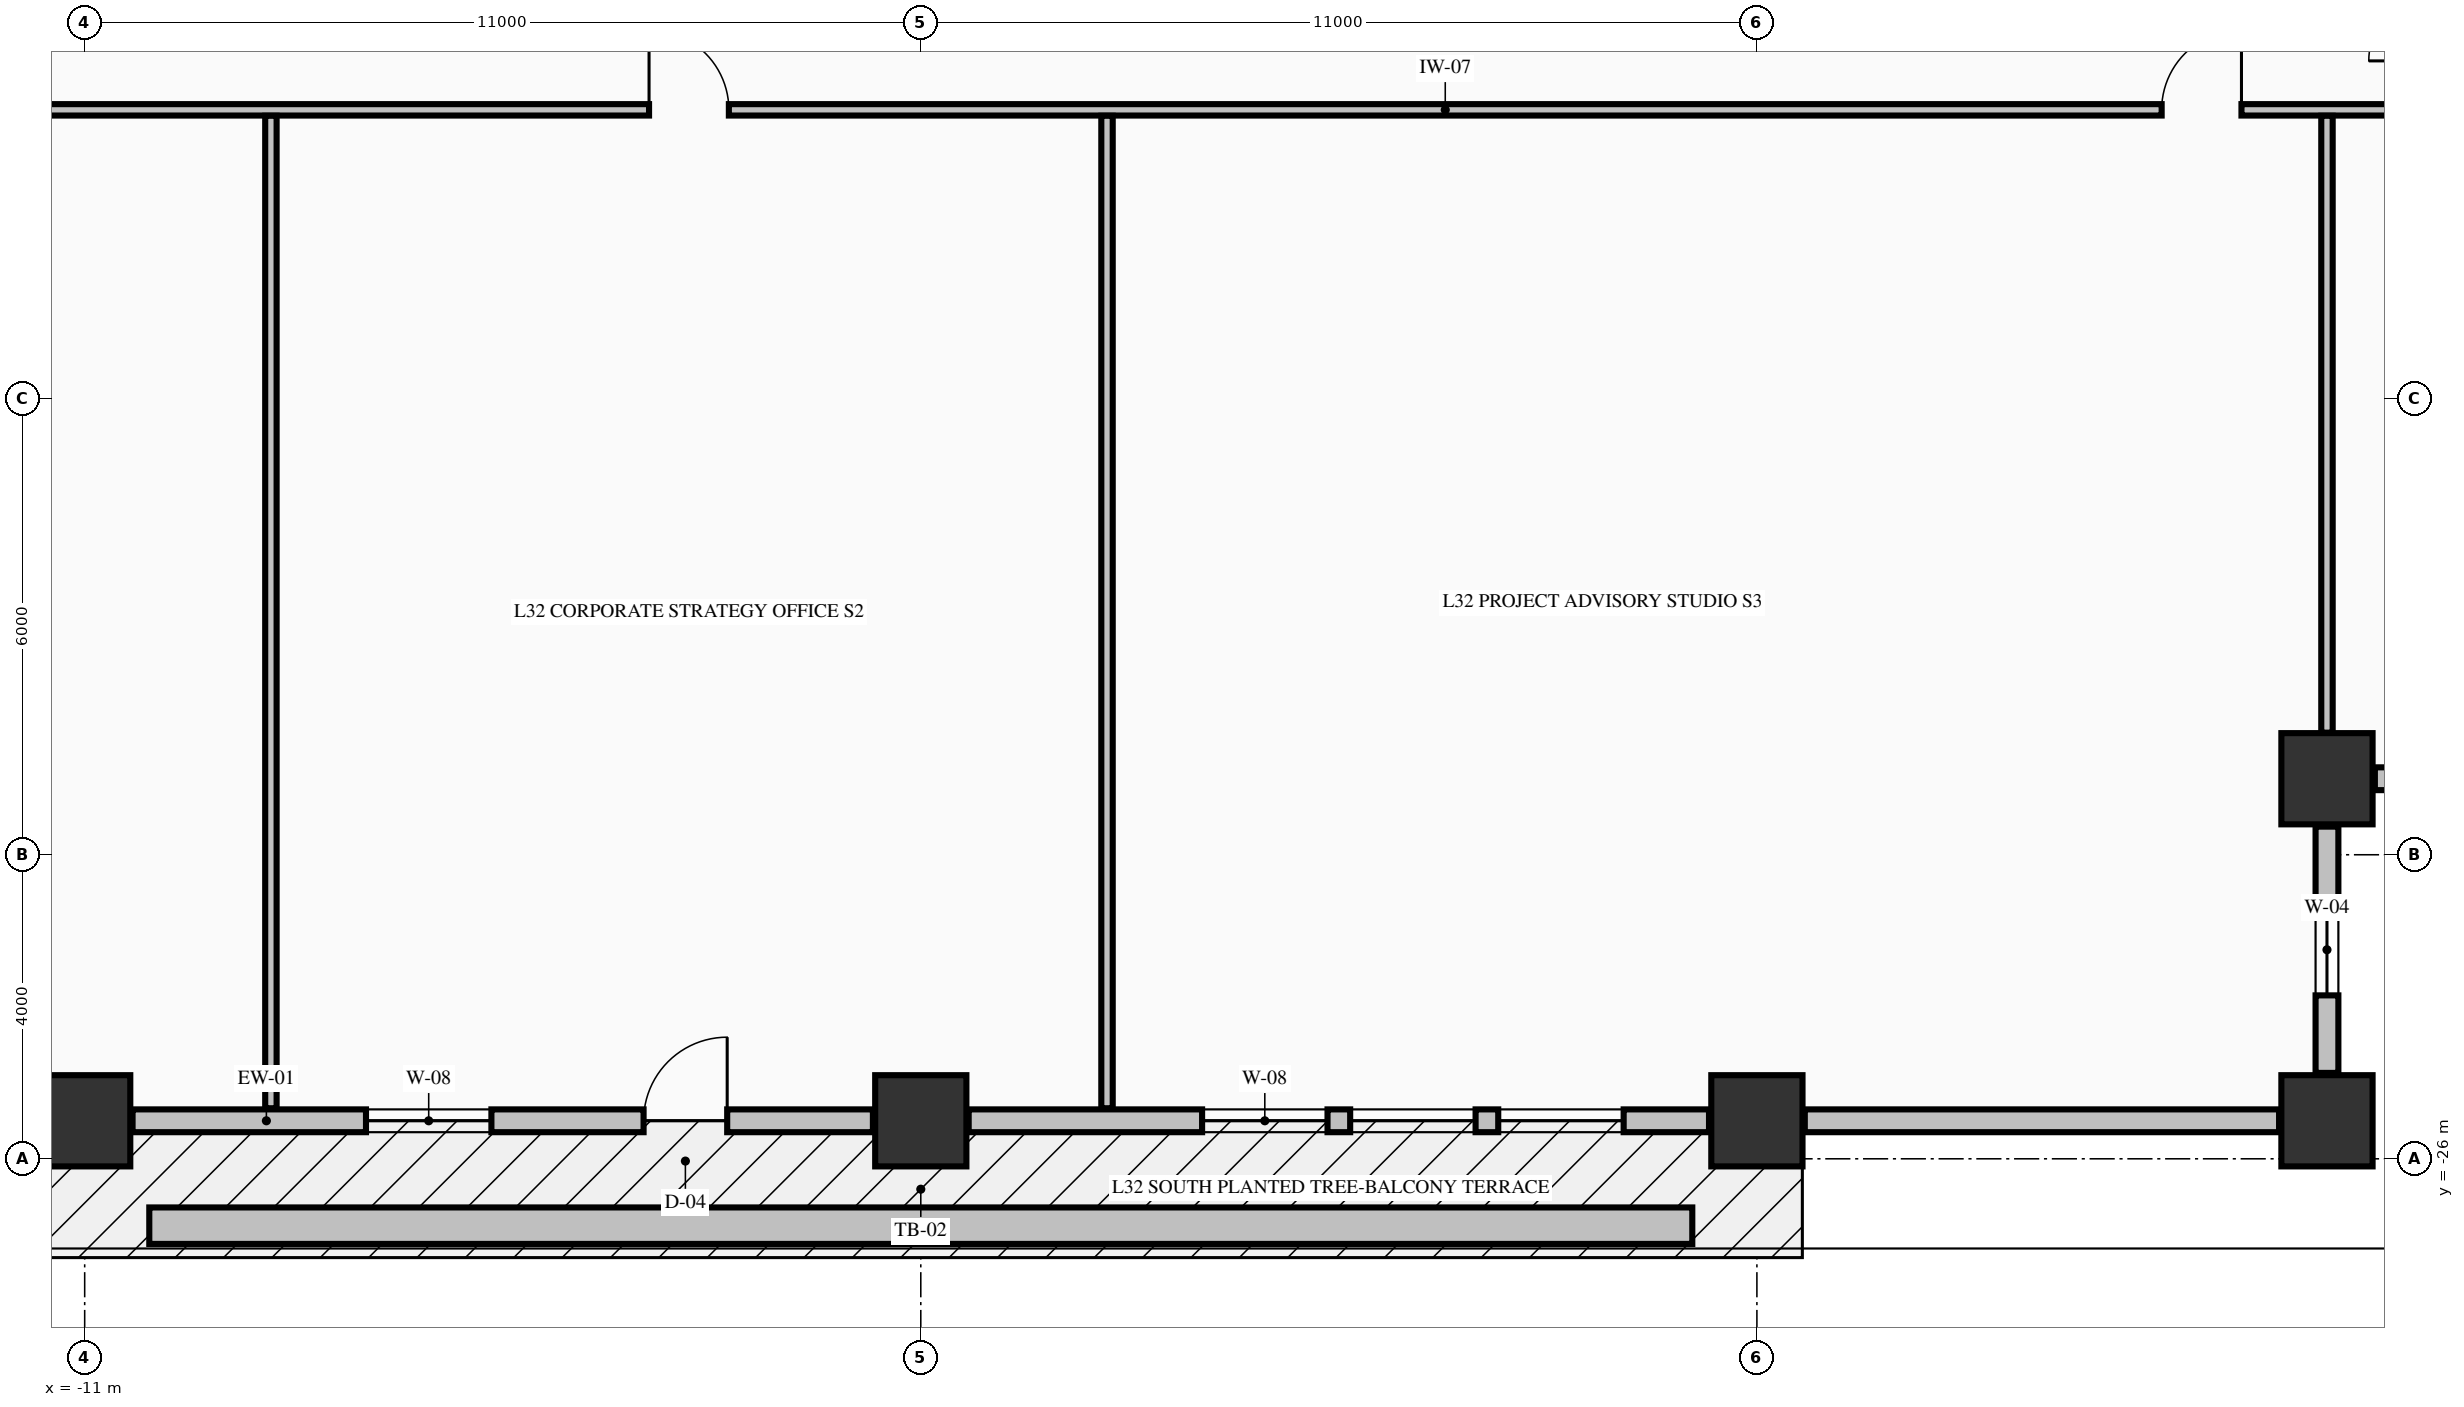
"""IFC4 building model, lengths in metres.
Left out: names, types, materials, properties, quantities, classifications, styles, units other than length and angle.
Written with IfcOpenShell. Run it as: python <this file> out.ifc"""

import sys

from ifc_helpers import new_model, si_unit, direction, frame, frame_2d, origin, origin_2d, place, context, subcontext, project, spatial, rectangle, extrude, element, fill, save


model = new_model("IFC4")
c1 = context("Model", 3, precision=1e-05, world=origin(), true_north=direction((0.0, 1.0)))
c2 = subcontext(c1, "Body", "Model", "MODEL_VIEW")
j1 = project(units=[si_unit("LENGTHUNIT", "METRE"), si_unit("PLANEANGLEUNIT", "RADIAN")], contexts=[c1])
p1 = place(None, origin())
s1 = spatial("IfcSite", under=j1, at=p1, CompositionType="ELEMENT")
p2 = place(p1, origin())
s2 = spatial("IfcBuilding", under=s1, at=p2, CompositionType="ELEMENT")
p3 = place(p2, frame((0.0, 0.0, 128.49)))
s3 = spatial("IfcBuildingStorey", under=s2, at=p3, CompositionType="ELEMENT", Elevation=128.49)
for number, where, z_axis, x_axis in (
    (1, (-11.0, -25.5, -0.25), (0.0, 0.0, 1.0), (1.0, 0.0, 0.0)),
    (2, (0.0, -25.5, -0.25), (0.0, 0.0, 1.0), (1.0, 0.0, 0.0)),
    (3, (11.0, -25.5, -0.25), (0.0, 0.0, 1.0), (1.0, 0.0, 0.0)),
    (4, (18.5, -25.5, -0.25), (0.0, 0.0, 1.0), (1.0, 0.0, 0.0)),
    (5, (18.5, -21.0, -0.25), (0.0, 0.0, 1.0), (1.0, 0.0, 0.0)),
):
    element("IfcColumn", number, at=place(p3, frame(where, z_axis=z_axis, x_axis=x_axis)), inside=s3, PredefinedType="COLUMN", context=c2, shape_type="SweptSolid", body=[
        extrude(rectangle(XDim=1.2, YDim=1.2, at=origin_2d()), origin(), (0.0, 0.0, 1.0), 3.57),
    ])
p4 = place(p3, frame((18.5, -24.87, 0.0), z_axis=(0.0, 0.0, 1.0), x_axis=(0.0, 1.0, 0.0)))
e6 = element("IfcWall", 6, at=p4, inside=s3, PredefinedType="STANDARD", context=c2, shape_type="SweptSolid", body=[
    extrude(rectangle(XDim=3.24, YDim=0.3, at=frame_2d((1.62, 0.0))), origin(), (0.0, 0.0, 1.0), 2.712),
])
p5 = place(p4, frame((1.02, 0.0, 0.82)))
e7 = element("IfcOpeningElement", 7, at=p5, cuts=e6, PredefinedType="OPENING", context=c2, shape_type="SweptSolid", body=[
    extrude(rectangle(XDim=1.2, YDim=1.65, at=frame_2d((0.6, 0.825))), frame((0.0, 0.16, 0.0), z_axis=(0.0, -1.0, 0.0), x_axis=(1.0, 0.0, 0.0)), (0.0, 0.0, 1.0), 0.32),
])
p6 = place(p3, frame((19.13, -21.0, 0.0), z_axis=(0.0, 0.0, 1.0), x_axis=(1.0, 0.0, 0.0)))
e8 = element("IfcWall", 8, at=p6, inside=s3, PredefinedType="STANDARD", context=c2, shape_type="SweptSolid", body=[
    extrude(rectangle(XDim=3.24, YDim=0.3, at=frame_2d((1.62, 0.0))), origin(), (0.0, 0.0, 1.0), 2.712),
])
p7 = place(p6, frame((1.02, 0.0, 0.82)))
e9 = element("IfcOpeningElement", 9, at=p7, cuts=e8, PredefinedType="OPENING", context=c2, shape_type="SweptSolid", body=[
    extrude(rectangle(XDim=1.2, YDim=1.65, at=frame_2d((0.6, 0.825))), frame((0.0, 0.16, 0.0), z_axis=(0.0, -1.0, 0.0), x_axis=(1.0, 0.0, 0.0)), (0.0, 0.0, 1.0), 0.32),
])
p8 = place(p3, frame((-10.37, -25.5, 0.0), z_axis=(0.0, 0.0, 1.0), x_axis=(1.0, 0.0, 0.0)))
e10 = element("IfcWall", 10, at=p8, inside=s3, PredefinedType="STANDARD", context=c2, shape_type="SweptSolid", body=[
    extrude(rectangle(XDim=9.74, YDim=0.3, at=frame_2d((4.87, 0.0))), origin(), (0.0, 0.0, 1.0), 2.712),
])
p9 = place(p8, frame((6.723, 0.0, 0.0)))
e11 = element("IfcOpeningElement", 11, at=p9, cuts=e10, PredefinedType="OPENING", context=c2, shape_type="SweptSolid", body=[
    extrude(rectangle(XDim=1.1, YDim=2.15, at=frame_2d((0.55, 1.075))), frame((0.0, 0.16, 0.0), z_axis=(0.0, -1.0, 0.0), x_axis=(1.0, 0.0, 0.0)), (0.0, 0.0, 1.0), 0.32),
])
p10 = place(p8, frame((3.071, 0.0, 0.8)))
e12 = element("IfcOpeningElement", 12, at=p10, cuts=e10, PredefinedType="OPENING", context=c2, shape_type="SweptSolid", body=[
    extrude(rectangle(XDim=1.65, YDim=1.7, at=frame_2d((0.825, 0.85))), frame((0.0, 0.16, 0.0), z_axis=(0.0, -1.0, 0.0), x_axis=(1.0, 0.0, 0.0)), (0.0, 0.0, 1.0), 0.32),
])
p11 = place(p3, frame((0.63, -25.5, 0.0), z_axis=(0.0, 0.0, 1.0), x_axis=(1.0, 0.0, 0.0)))
e13 = element("IfcWall", 13, at=p11, inside=s3, PredefinedType="STANDARD", context=c2, shape_type="SweptSolid", body=[
    extrude(rectangle(XDim=9.74, YDim=0.3, at=frame_2d((4.87, 0.0))), origin(), (0.0, 0.0, 1.0), 2.712),
])
p12 = place(p11, frame((3.071, 0.0, 0.8)))
e14 = element("IfcOpeningElement", 14, at=p12, cuts=e13, PredefinedType="OPENING", context=c2, shape_type="SweptSolid", body=[
    extrude(rectangle(XDim=1.65, YDim=1.7, at=frame_2d((0.825, 0.85))), frame((0.0, 0.16, 0.0), z_axis=(0.0, -1.0, 0.0), x_axis=(1.0, 0.0, 0.0)), (0.0, 0.0, 1.0), 0.32),
])
p13 = place(p11, frame((5.019, 0.0, 0.8)))
e15 = element("IfcOpeningElement", 15, at=p13, cuts=e13, PredefinedType="OPENING", context=c2, shape_type="SweptSolid", body=[
    extrude(rectangle(XDim=1.65, YDim=1.7, at=frame_2d((0.825, 0.85))), frame((0.0, 0.16, 0.0), z_axis=(0.0, -1.0, 0.0), x_axis=(1.0, 0.0, 0.0)), (0.0, 0.0, 1.0), 0.32),
])
p14 = place(p11, frame((6.967, 0.0, 0.8)))
e16 = element("IfcOpeningElement", 16, at=p14, cuts=e13, PredefinedType="OPENING", context=c2, shape_type="SweptSolid", body=[
    extrude(rectangle(XDim=1.65, YDim=1.7, at=frame_2d((0.825, 0.85))), frame((0.0, 0.16, 0.0), z_axis=(0.0, -1.0, 0.0), x_axis=(1.0, 0.0, 0.0)), (0.0, 0.0, 1.0), 0.32),
])
p15 = place(p3, frame((11.63, -25.5, 0.0), z_axis=(0.0, 0.0, 1.0), x_axis=(1.0, 0.0, 0.0)))
e17 = element("IfcWall", 17, at=p15, inside=s3, PredefinedType="STANDARD", context=c2, shape_type="SweptSolid", body=[
    extrude(rectangle(XDim=6.24, YDim=0.3, at=frame_2d((3.12, 0.0))), origin(), (0.0, 0.0, 1.0), 2.712),
])
p16 = place(p3, frame((-27.835, -12.2, 0.0), z_axis=(0.0, 0.0, 1.0), x_axis=(1.0, 0.0, 0.0)))
e18 = element("IfcWall", 18, at=p16, inside=s3, PredefinedType="PARTITIONING", context=c2, shape_type="SweptSolid", body=[
    extrude(rectangle(XDim=50.67, YDim=0.15, at=frame_2d((25.335, 0.0))), origin(), (0.0, 0.0, 1.0), 3.32),
])
p17 = place(p16, frame((13.13, 0.0, 0.0)))
e19 = element("IfcOpeningElement", 19, at=p17, cuts=e18, PredefinedType="OPENING", context=c2, shape_type="SweptSolid", body=[
    extrude(rectangle(XDim=1.05, YDim=2.15, at=frame_2d((0.525, 1.075))), frame((0.0, 0.085, 0.0), z_axis=(0.0, -1.0, 0.0), x_axis=(1.0, 0.0, 0.0)), (0.0, 0.0, 1.0), 0.17),
])
p18 = place(p16, frame((24.26, 0.0, 0.0)))
e20 = element("IfcOpeningElement", 20, at=p18, cuts=e18, PredefinedType="OPENING", context=c2, shape_type="SweptSolid", body=[
    extrude(rectangle(XDim=1.05, YDim=2.15, at=frame_2d((0.525, 1.075))), frame((0.0, 0.085, 0.0), z_axis=(0.0, -1.0, 0.0), x_axis=(1.0, 0.0, 0.0)), (0.0, 0.0, 1.0), 0.17),
])
p19 = place(p16, frame((44.16, 0.0, 0.0)))
e21 = element("IfcOpeningElement", 21, at=p19, cuts=e18, PredefinedType="OPENING", context=c2, shape_type="SweptSolid", body=[
    extrude(rectangle(XDim=1.05, YDim=2.15, at=frame_2d((0.525, 1.075))), frame((0.0, 0.085, 0.0), z_axis=(0.0, -1.0, 0.0), x_axis=(1.0, 0.0, 0.0)), (0.0, 0.0, 1.0), 0.17),
])
for number, where, z_axis, x_axis in (
    (22, (-8.55, -25.335, 0.0), (0.0, 0.0, 1.0), (0.0, 1.0, 0.0)),
    (23, (2.45, -25.335, 0.0), (0.0, 0.0, 1.0), (0.0, 1.0, 0.0)),
):
    element("IfcWall", number, at=place(p3, frame(where, z_axis=z_axis, x_axis=x_axis)), inside=s3, PredefinedType="PARTITIONING", context=c2, shape_type="SweptSolid", body=[
        extrude(rectangle(XDim=13.057, YDim=0.15, at=frame_2d((6.528, 0.0))), origin(), (0.0, 0.0, 1.0), 3.32),
    ])
p20 = place(p3, frame((18.5, -20.394, 0.0), z_axis=(0.0, 0.0, 1.0), x_axis=(0.0, 1.0, 0.0)))
e24 = element("IfcWall", 24, at=p20, inside=s3, PredefinedType="PARTITIONING", context=c2, shape_type="SweptSolid", body=[
    extrude(rectangle(XDim=8.116, YDim=0.15, at=frame_2d((4.058, 0.0))), origin(), (0.0, 0.0, 1.0), 3.32),
])
p21 = place(p3, frame((-10.15, -26.88, -0.04), z_axis=(0.0, 0.0, 1.0), x_axis=(1.0, 0.0, 0.0)))
e25 = element("IfcWall", 25, at=p21, inside=s3, PredefinedType="PARAPET", context=c2, shape_type="SweptSolid", body=[
    extrude(rectangle(XDim=20.3, YDim=0.48, at=frame_2d((10.15, 0.0))), origin(), (0.0, 0.0, 1.0), 0.52),
])
p22 = place(p5, origin())
e26 = element("IfcWindow", 26, at=p22, inside=s3, PartitioningType="SINGLE_PANEL", PredefinedType="WINDOW", context=c2, shape_type="SweptSolid", body=[
    extrude(rectangle(XDim=1.2, YDim=1.65, at=frame_2d((0.6, 0.825))), frame((0.0, 0.03, 0.0), z_axis=(0.0, -1.0, 0.0), x_axis=(1.0, 0.0, 0.0)), (0.0, 0.0, 1.0), 0.06),
])
fill(e7, e26)
p23 = place(p9, origin())
e27 = element("IfcDoor", 27, at=p23, inside=s3, OperationType="SINGLE_SWING_RIGHT", PredefinedType="DOOR", context=c2, shape_type="SweptSolid", body=[
    extrude(rectangle(XDim=1.1, YDim=2.15, at=frame_2d((0.55, 1.075))), frame((0.0, 0.025, 0.0), z_axis=(0.0, -1.0, 0.0), x_axis=(1.0, 0.0, 0.0)), (0.0, 0.0, 1.0), 0.05),
])
fill(e11, e27)
p24 = place(p10, origin())
e28 = element("IfcWindow", 28, at=p24, inside=s3, PartitioningType="SINGLE_PANEL", PredefinedType="WINDOW", context=c2, shape_type="SweptSolid", body=[
    extrude(rectangle(XDim=1.65, YDim=1.7, at=frame_2d((0.825, 0.85))), frame((0.0, 0.03, 0.0), z_axis=(0.0, -1.0, 0.0), x_axis=(1.0, 0.0, 0.0)), (0.0, 0.0, 1.0), 0.06),
])
fill(e12, e28)
p25 = place(p12, origin())
e29 = element("IfcWindow", 29, at=p25, inside=s3, PartitioningType="SINGLE_PANEL", PredefinedType="WINDOW", context=c2, shape_type="SweptSolid", body=[
    extrude(rectangle(XDim=1.65, YDim=1.7, at=frame_2d((0.825, 0.85))), frame((0.0, 0.03, 0.0), z_axis=(0.0, -1.0, 0.0), x_axis=(1.0, 0.0, 0.0)), (0.0, 0.0, 1.0), 0.06),
])
fill(e14, e29)
p26 = place(p13, origin())
e30 = element("IfcWindow", 30, at=p26, inside=s3, PartitioningType="SINGLE_PANEL", PredefinedType="WINDOW", context=c2, shape_type="SweptSolid", body=[
    extrude(rectangle(XDim=1.65, YDim=1.7, at=frame_2d((0.825, 0.85))), frame((0.0, 0.03, 0.0), z_axis=(0.0, -1.0, 0.0), x_axis=(1.0, 0.0, 0.0)), (0.0, 0.0, 1.0), 0.06),
])
fill(e15, e30)
p27 = place(p14, origin())
e31 = element("IfcWindow", 31, at=p27, inside=s3, PartitioningType="SINGLE_PANEL", PredefinedType="WINDOW", context=c2, shape_type="SweptSolid", body=[
    extrude(rectangle(XDim=1.65, YDim=1.7, at=frame_2d((0.825, 0.85))), frame((0.0, 0.03, 0.0), z_axis=(0.0, -1.0, 0.0), x_axis=(1.0, 0.0, 0.0)), (0.0, 0.0, 1.0), 0.06),
])
fill(e16, e31)
p28 = place(p18, origin())
e32 = element("IfcDoor", 32, at=p28, inside=s3, OperationType="SINGLE_SWING_LEFT", PredefinedType="DOOR", context=c2, shape_type="SweptSolid", body=[
    extrude(rectangle(XDim=1.05, YDim=2.15, at=frame_2d((0.525, 1.075))), frame((0.0, 0.025, 0.0), z_axis=(0.0, -1.0, 0.0), x_axis=(1.0, 0.0, 0.0)), (0.0, 0.0, 1.0), 0.05),
])
fill(e20, e32)
p29 = place(p19, origin())
e33 = element("IfcDoor", 33, at=p29, inside=s3, OperationType="SINGLE_SWING_RIGHT", PredefinedType="DOOR", context=c2, shape_type="SweptSolid", body=[
    extrude(rectangle(XDim=1.05, YDim=2.15, at=frame_2d((0.525, 1.075))), frame((0.0, 0.025, 0.0), z_axis=(0.0, -1.0, 0.0), x_axis=(1.0, 0.0, 0.0)), (0.0, 0.0, 1.0), 0.05),
])
fill(e21, e33)
save(model, sys.argv[1])
